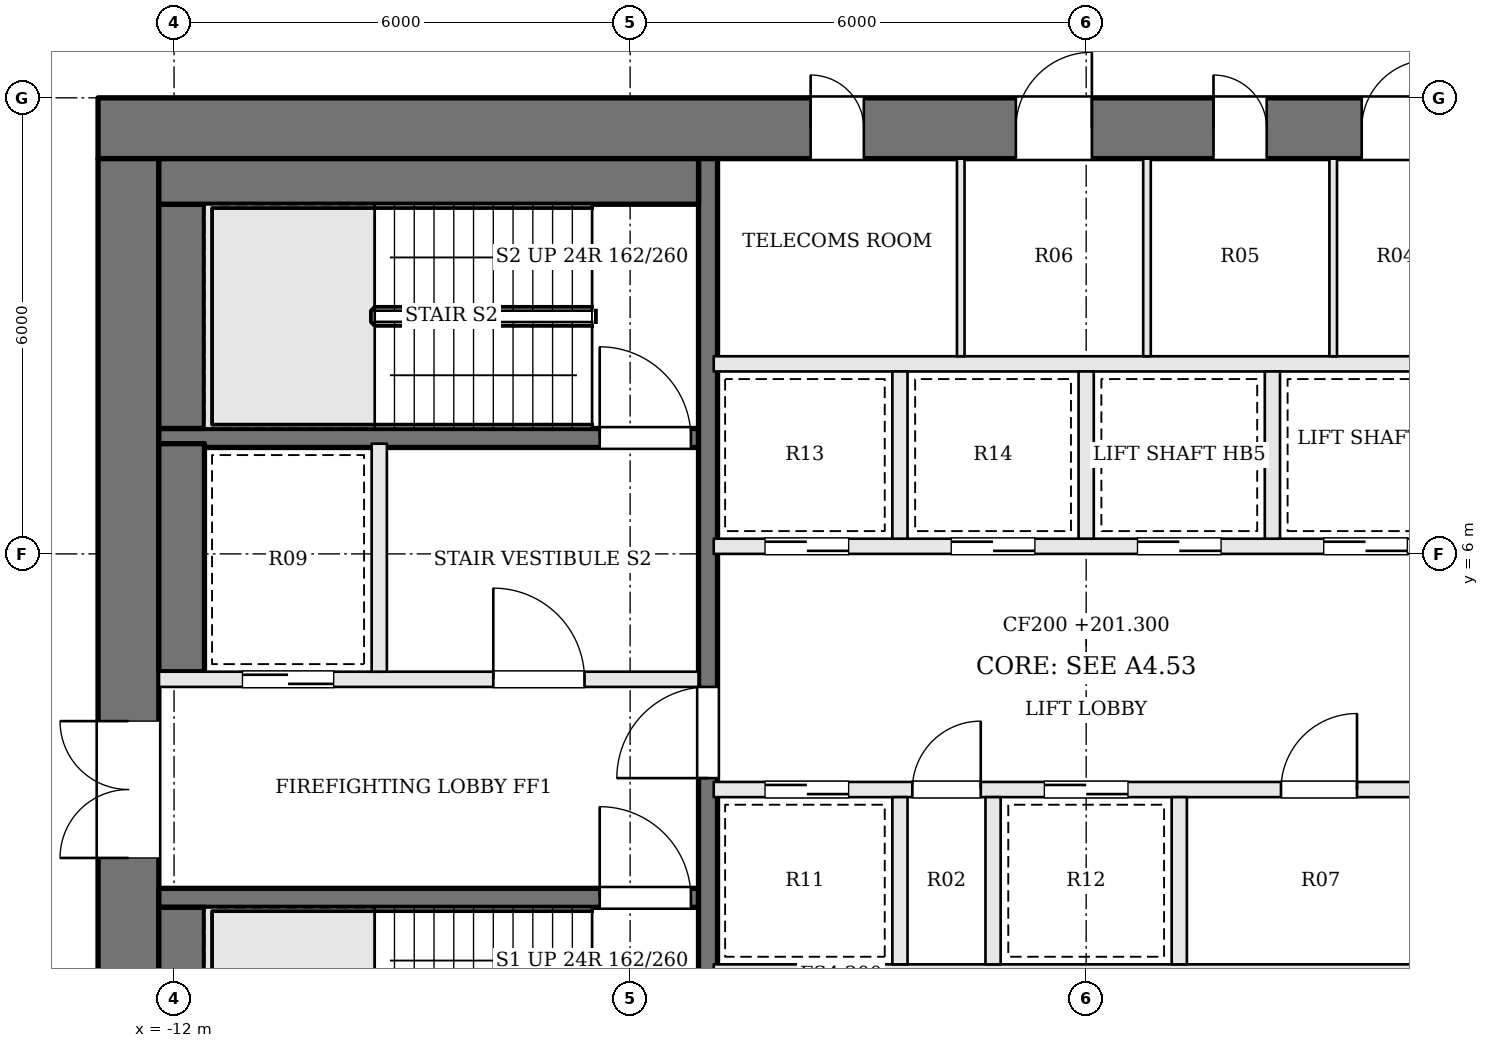
"""IFC4 building model, lengths in metres.
Left out: names, types, materials, properties, quantities, classifications, styles, units other than length and angle.
Written with IfcOpenShell. Run it as: python <this file> out.ifc"""

import sys

from ifc_helpers import new_model, si_unit, direction, frame, frame_2d, origin, place, context, subcontext, project, spatial, rectangle, extrude, element, fill, save


model = new_model("IFC4")
c1 = context("Model", 3, precision=1e-05, world=origin(), true_north=direction((0.0, 1.0)))
c2 = subcontext(c1, "Body", "Model", "MODEL_VIEW")
j1 = project(units=[si_unit("LENGTHUNIT", "METRE"), si_unit("PLANEANGLEUNIT", "RADIAN")], contexts=[c1])
p1 = place(None, origin())
s1 = spatial("IfcSite", under=j1, at=p1, CompositionType="ELEMENT")
p2 = place(p1, origin())
s2 = spatial("IfcBuilding", under=s1, at=p2, CompositionType="ELEMENT")
p3 = place(p2, frame((0.0, 0.0, 201.3)))
s3 = spatial("IfcBuildingStorey", under=s2, at=p3, CompositionType="ELEMENT", Elevation=201.3)
p4 = place(p3, frame((-13.0, 11.6, 0.0), z_axis=(0.0, 0.0, 1.0), x_axis=(1.0, 0.0, 0.0)))
e1 = element("IfcWall", 1, at=p4, inside=s3, PredefinedType="SHEAR", context=c2, shape_type="SweptSolid", body=[
    extrude(rectangle(XDim=26.0, YDim=0.8, at=frame_2d((13.0, 0.0))), origin(), (0.0, 0.0, 1.0), 3.9),
])
p5 = place(p4, frame((9.375, 0.0, 0.0)))
e2 = element("IfcOpeningElement", 2, at=p5, cuts=e1, PredefinedType="OPENING", context=c2, shape_type="SweptSolid", body=[
    extrude(rectangle(XDim=0.7, YDim=2.1, at=frame_2d((0.35, 1.05))), frame((0.0, 0.41, 0.0), z_axis=(0.0, -1.0, 0.0), x_axis=(1.0, 0.0, 0.0)), (0.0, 0.0, 1.0), 0.82),
])
p6 = place(p4, frame((12.075, 0.0, 0.0)))
e3 = element("IfcOpeningElement", 3, at=p6, cuts=e1, PredefinedType="OPENING", context=c2, shape_type="SweptSolid", body=[
    extrude(rectangle(XDim=1.0, YDim=2.1, at=frame_2d((0.5, 1.05))), frame((0.0, 0.41, 0.0), z_axis=(0.0, -1.0, 0.0), x_axis=(1.0, 0.0, 0.0)), (0.0, 0.0, 1.0), 0.82),
])
p7 = place(p4, frame((14.675, 0.0, 0.0)))
e4 = element("IfcOpeningElement", 4, at=p7, cuts=e1, PredefinedType="OPENING", context=c2, shape_type="SweptSolid", body=[
    extrude(rectangle(XDim=0.7, YDim=2.1, at=frame_2d((0.35, 1.05))), frame((0.0, 0.41, 0.0), z_axis=(0.0, -1.0, 0.0), x_axis=(1.0, 0.0, 0.0)), (0.0, 0.0, 1.0), 0.82),
])
p8 = place(p4, frame((16.625, 0.0, 0.0)))
e5 = element("IfcOpeningElement", 5, at=p8, cuts=e1, PredefinedType="OPENING", context=c2, shape_type="SweptSolid", body=[
    extrude(rectangle(XDim=0.9, YDim=2.1, at=frame_2d((0.45, 1.05))), frame((0.0, 0.41, 0.0), z_axis=(0.0, -1.0, 0.0), x_axis=(1.0, 0.0, 0.0)), (0.0, 0.0, 1.0), 0.82),
])
p9 = place(p3, frame((-12.6, -2.2, 0.0), z_axis=(0.0, 0.0, 1.0), x_axis=(0.0, 1.0, 0.0)))
e6 = element("IfcWall", 6, at=p9, inside=s3, PredefinedType="SHEAR", context=c2, shape_type="SweptSolid", body=[
    extrude(rectangle(XDim=13.4, YDim=0.8, at=frame_2d((6.7, 0.0))), origin(), (0.0, 0.0, 1.0), 3.9),
])
p10 = place(p9, frame((4.2, 0.0, 0.0)))
e7 = element("IfcOpeningElement", 7, at=p10, cuts=e6, PredefinedType="OPENING", context=c2, shape_type="SweptSolid", body=[
    extrude(rectangle(XDim=1.8, YDim=2.1, at=frame_2d((0.9, 1.05))), frame((0.0, 0.41, 0.0), z_axis=(0.0, -1.0, 0.0), x_axis=(1.0, 0.0, 0.0)), (0.0, 0.0, 1.0), 0.82),
])
p11 = place(p3, frame((-12.2, 1.475, 0.0), z_axis=(0.0, 0.0, 1.0), x_axis=(1.0, 0.0, 0.0)))
e8 = element("IfcWall", 8, at=p11, inside=s3, PredefinedType="SOLIDWALL", context=c2, shape_type="SweptSolid", body=[
    extrude(rectangle(XDim=7.1, YDim=0.25, at=frame_2d((3.55, 0.0))), origin(), (0.0, 0.0, 1.0), 3.7),
])
p12 = place(p11, frame((5.8, 0.0, 0.0)))
e9 = element("IfcOpeningElement", 9, at=p12, cuts=e8, PredefinedType="OPENING", context=c2, shape_type="SweptSolid", body=[
    extrude(rectangle(XDim=1.2, YDim=2.1, at=frame_2d((0.6, 1.05))), frame((0.0, 0.135, 0.0), z_axis=(0.0, -1.0, 0.0), x_axis=(1.0, 0.0, 0.0)), (0.0, 0.0, 1.0), 0.27),
])
p13 = place(p3, frame((-12.2, 4.35, 0.0), z_axis=(0.0, 0.0, 1.0), x_axis=(1.0, 0.0, 0.0)))
e10 = element("IfcWall", 10, at=p13, inside=s3, PredefinedType="SOLIDWALL", context=c2, shape_type="SweptSolid", body=[
    extrude(rectangle(XDim=7.1, YDim=0.2, at=frame_2d((3.55, 0.0))), origin(), (0.0, 0.0, 1.0), 3.7),
])
p14 = place(p13, frame((4.4, 0.0, 0.0)))
e11 = element("IfcOpeningElement", 11, at=p14, cuts=e10, PredefinedType="OPENING", context=c2, shape_type="SweptSolid", body=[
    extrude(rectangle(XDim=1.2, YDim=2.1, at=frame_2d((0.6, 1.05))), frame((0.0, 0.11, 0.0), z_axis=(0.0, -1.0, 0.0), x_axis=(1.0, 0.0, 0.0)), (0.0, 0.0, 1.0), 0.22),
])
p15 = place(p13, frame((1.1, 0.0, 0.0)))
e12 = element("IfcOpeningElement", 12, at=p15, cuts=e10, PredefinedType="OPENING", context=c2, shape_type="SweptSolid", body=[
    extrude(rectangle(XDim=1.2, YDim=2.1, at=frame_2d((0.6, 1.05))), frame((0.0, 0.11, 0.0), z_axis=(0.0, -1.0, 0.0), x_axis=(1.0, 0.0, 0.0)), (0.0, 0.0, 1.0), 0.22),
])
p16 = place(p3, frame((-12.2, 7.525, 0.0), z_axis=(0.0, 0.0, 1.0), x_axis=(1.0, 0.0, 0.0)))
e13 = element("IfcWall", 13, at=p16, inside=s3, PredefinedType="SOLIDWALL", context=c2, shape_type="SweptSolid", body=[
    extrude(rectangle(XDim=7.1, YDim=0.25, at=frame_2d((3.55, 0.0))), origin(), (0.0, 0.0, 1.0), 3.7),
])
p17 = place(p16, frame((5.8, 0.0, 0.0)))
e14 = element("IfcOpeningElement", 14, at=p17, cuts=e13, PredefinedType="OPENING", context=c2, shape_type="SweptSolid", body=[
    extrude(rectangle(XDim=1.2, YDim=2.1, at=frame_2d((0.6, 1.05))), frame((0.0, 0.135, 0.0), z_axis=(0.0, -1.0, 0.0), x_axis=(1.0, 0.0, 0.0)), (0.0, 0.0, 1.0), 0.27),
])
p18 = place(p3, frame((-9.3, 4.45, 0.0), z_axis=(0.0, 0.0, 1.0), x_axis=(0.0, 1.0, 0.0)))
e15 = element("IfcWall", 15, at=p18, inside=s3, PredefinedType="SOLIDWALL", context=c2, shape_type="SweptSolid", body=[
    extrude(rectangle(XDim=3.0, YDim=0.2, at=frame_2d((1.5, 0.0))), origin(), (0.0, 0.0, 1.0), 3.7),
])
p19 = place(p3, frame((-4.975, -2.2, 0.0), z_axis=(0.0, 0.0, 1.0), x_axis=(0.0, 1.0, 0.0)))
e16 = element("IfcWall", 16, at=p19, inside=s3, PredefinedType="SOLIDWALL", context=c2, shape_type="SweptSolid", body=[
    extrude(rectangle(XDim=13.4, YDim=0.25, at=frame_2d((6.7, 0.0))), origin(), (0.0, 0.0, 1.0), 3.7),
])
p20 = place(p19, frame((5.25, 0.0, 0.0)))
e17 = element("IfcOpeningElement", 17, at=p20, cuts=e16, PredefinedType="OPENING", context=c2, shape_type="SweptSolid", body=[
    extrude(rectangle(XDim=1.2, YDim=2.1, at=frame_2d((0.6, 1.05))), frame((0.0, 0.135, 0.0), z_axis=(0.0, -1.0, 0.0), x_axis=(1.0, 0.0, 0.0)), (0.0, 0.0, 1.0), 0.27),
])
p21 = place(p3, frame((-11.9, -1.6, 0.0), z_axis=(0.0, 0.0, 1.0), x_axis=(0.0, 1.0, 0.0)))
e18 = element("IfcWall", 18, at=p21, inside=s3, PredefinedType="SOLIDWALL", context=c2, shape_type="SweptSolid", body=[
    extrude(rectangle(XDim=2.95, YDim=0.6, at=frame_2d((1.475, 0.0))), origin(), (0.0, 0.0, 1.0), 3.7),
])
p22 = place(p3, frame((-11.9, 4.45, 0.0), z_axis=(0.0, 0.0, 1.0), x_axis=(0.0, 1.0, 0.0)))
e19 = element("IfcWall", 19, at=p22, inside=s3, PredefinedType="SOLIDWALL", context=c2, shape_type="SweptSolid", body=[
    extrude(rectangle(XDim=3.0, YDim=0.6, at=frame_2d((1.5, 0.0))), origin(), (0.0, 0.0, 1.0), 3.7),
])
p23 = place(p3, frame((-11.9, 7.65, 0.0), z_axis=(0.0, 0.0, 1.0), x_axis=(0.0, 1.0, 0.0)))
e20 = element("IfcWall", 20, at=p23, inside=s3, PredefinedType="SOLIDWALL", context=c2, shape_type="SweptSolid", body=[
    extrude(rectangle(XDim=2.95, YDim=0.6, at=frame_2d((1.475, 0.0))), origin(), (0.0, 0.0, 1.0), 3.7),
])
p24 = place(p3, frame((-12.2, 10.9, 0.0), z_axis=(0.0, 0.0, 1.0), x_axis=(1.0, 0.0, 0.0)))
e21 = element("IfcWall", 21, at=p24, inside=s3, PredefinedType="SOLIDWALL", context=c2, shape_type="SweptSolid", body=[
    extrude(rectangle(XDim=7.1, YDim=0.6, at=frame_2d((3.55, 0.0))), origin(), (0.0, 0.0, 1.0), 3.7),
])
p25 = place(p3, frame((-4.9, 0.5, 0.0), z_axis=(0.0, 0.0, 1.0), x_axis=(1.0, 0.0, 0.0)))
e22 = element("IfcWall", 22, at=p25, inside=s3, PredefinedType="SOLIDWALL", context=c2, shape_type="SweptSolid", body=[
    extrude(rectangle(XDim=9.8, YDim=0.2, at=frame_2d((4.9, 0.0))), origin(), (0.0, 0.0, 1.0), 3.7),
])
p26 = place(p3, frame((-4.9, 2.9, 0.0), z_axis=(0.0, 0.0, 1.0), x_axis=(1.0, 0.0, 0.0)))
e23 = element("IfcWall", 23, at=p26, inside=s3, PredefinedType="SOLIDWALL", context=c2, shape_type="SweptSolid", body=[
    extrude(rectangle(XDim=9.8, YDim=0.2, at=frame_2d((4.9, 0.0))), origin(), (0.0, 0.0, 1.0), 3.7),
])
p27 = place(p26, frame((0.675, 0.0, 0.0)))
e24 = element("IfcOpeningElement", 24, at=p27, cuts=e23, PredefinedType="OPENING", context=c2, shape_type="SweptSolid", body=[
    extrude(rectangle(XDim=1.1, YDim=2.1, at=frame_2d((0.55, 1.05))), frame((0.0, 0.11, 0.0), z_axis=(0.0, -1.0, 0.0), x_axis=(1.0, 0.0, 0.0)), (0.0, 0.0, 1.0), 0.22),
])
p28 = place(p26, frame((2.613, 0.0, 0.0)))
e25 = element("IfcOpeningElement", 25, at=p28, cuts=e23, PredefinedType="OPENING", context=c2, shape_type="SweptSolid", body=[
    extrude(rectangle(XDim=0.9, YDim=2.1, at=frame_2d((0.45, 1.05))), frame((0.0, 0.11, 0.0), z_axis=(0.0, -1.0, 0.0), x_axis=(1.0, 0.0, 0.0)), (0.0, 0.0, 1.0), 0.22),
])
p29 = place(p26, frame((4.35, 0.0, 0.0)))
e26 = element("IfcOpeningElement", 26, at=p29, cuts=e23, PredefinedType="OPENING", context=c2, shape_type="SweptSolid", body=[
    extrude(rectangle(XDim=1.1, YDim=2.1, at=frame_2d((0.55, 1.05))), frame((0.0, 0.11, 0.0), z_axis=(0.0, -1.0, 0.0), x_axis=(1.0, 0.0, 0.0)), (0.0, 0.0, 1.0), 0.22),
])
p30 = place(p26, frame((7.463, 0.0, 0.0)))
e27 = element("IfcOpeningElement", 27, at=p30, cuts=e23, PredefinedType="OPENING", context=c2, shape_type="SweptSolid", body=[
    extrude(rectangle(XDim=1.0, YDim=2.1, at=frame_2d((0.5, 1.05))), frame((0.0, 0.11, 0.0), z_axis=(0.0, -1.0, 0.0), x_axis=(1.0, 0.0, 0.0)), (0.0, 0.0, 1.0), 0.22),
])
p31 = place(p3, frame((-4.9, 6.1, 0.0), z_axis=(0.0, 0.0, 1.0), x_axis=(1.0, 0.0, 0.0)))
e28 = element("IfcWall", 28, at=p31, inside=s3, PredefinedType="SOLIDWALL", context=c2, shape_type="SweptSolid", body=[
    extrude(rectangle(XDim=9.8, YDim=0.2, at=frame_2d((4.9, 0.0))), origin(), (0.0, 0.0, 1.0), 3.7),
])
p32 = place(p31, frame((0.675, 0.0, 0.0)))
e29 = element("IfcOpeningElement", 29, at=p32, cuts=e28, PredefinedType="OPENING", context=c2, shape_type="SweptSolid", body=[
    extrude(rectangle(XDim=1.1, YDim=2.1, at=frame_2d((0.55, 1.05))), frame((0.0, 0.11, 0.0), z_axis=(0.0, -1.0, 0.0), x_axis=(1.0, 0.0, 0.0)), (0.0, 0.0, 1.0), 0.22),
])
p33 = place(p31, frame((3.125, 0.0, 0.0)))
e30 = element("IfcOpeningElement", 30, at=p33, cuts=e28, PredefinedType="OPENING", context=c2, shape_type="SweptSolid", body=[
    extrude(rectangle(XDim=1.1, YDim=2.1, at=frame_2d((0.55, 1.05))), frame((0.0, 0.11, 0.0), z_axis=(0.0, -1.0, 0.0), x_axis=(1.0, 0.0, 0.0)), (0.0, 0.0, 1.0), 0.22),
])
p34 = place(p31, frame((5.575, 0.0, 0.0)))
e31 = element("IfcOpeningElement", 31, at=p34, cuts=e28, PredefinedType="OPENING", context=c2, shape_type="SweptSolid", body=[
    extrude(rectangle(XDim=1.1, YDim=2.1, at=frame_2d((0.55, 1.05))), frame((0.0, 0.11, 0.0), z_axis=(0.0, -1.0, 0.0), x_axis=(1.0, 0.0, 0.0)), (0.0, 0.0, 1.0), 0.22),
])
p35 = place(p31, frame((8.025, 0.0, 0.0)))
e32 = element("IfcOpeningElement", 32, at=p35, cuts=e28, PredefinedType="OPENING", context=c2, shape_type="SweptSolid", body=[
    extrude(rectangle(XDim=1.1, YDim=2.1, at=frame_2d((0.55, 1.05))), frame((0.0, 0.11, 0.0), z_axis=(0.0, -1.0, 0.0), x_axis=(1.0, 0.0, 0.0)), (0.0, 0.0, 1.0), 0.22),
])
p36 = place(p3, frame((-4.9, 8.5, 0.0), z_axis=(0.0, 0.0, 1.0), x_axis=(1.0, 0.0, 0.0)))
e33 = element("IfcWall", 33, at=p36, inside=s3, PredefinedType="SOLIDWALL", context=c2, shape_type="SweptSolid", body=[
    extrude(rectangle(XDim=9.8, YDim=0.2, at=frame_2d((4.9, 0.0))), origin(), (0.0, 0.0, 1.0), 3.7),
])
for number, where, z_axis, x_axis in (
    (34, (-2.45, 0.6, 0.0), (0.0, 0.0, 1.0), (0.0, 1.0, 0.0)),
    (35, (-1.225, 0.6, 0.0), (0.0, 0.0, 1.0), (0.0, 1.0, 0.0)),
    (36, (1.225, 0.6, 0.0), (0.0, 0.0, 1.0), (0.0, 1.0, 0.0)),
    (37, (-2.45, 6.2, 0.0), (0.0, 0.0, 1.0), (0.0, 1.0, 0.0)),
    (38, (0.0, 6.2, 0.0), (0.0, 0.0, 1.0), (0.0, 1.0, 0.0)),
    (39, (2.45, 6.2, 0.0), (0.0, 0.0, 1.0), (0.0, 1.0, 0.0)),
):
    element("IfcWall", number, at=place(p3, frame(where, z_axis=z_axis, x_axis=x_axis)), inside=s3, PredefinedType="SOLIDWALL", context=c2, shape_type="SweptSolid", body=[
        extrude(rectangle(XDim=2.2, YDim=0.2, at=frame_2d((1.1, 0.0))), origin(), (0.0, 0.0, 1.0), 3.7),
    ])
for number, where, z_axis, x_axis in (
    (40, (-1.65, 8.6, 0.0), (0.0, 0.0, 1.0), (0.0, 1.0, 0.0)),
    (41, (0.8, 8.6, 0.0), (0.0, 0.0, 1.0), (0.0, 1.0, 0.0)),
    (42, (3.25, 8.6, 0.0), (0.0, 0.0, 1.0), (0.0, 1.0, 0.0)),
):
    element("IfcWall", number, at=place(p3, frame(where, z_axis=z_axis, x_axis=x_axis)), inside=s3, PredefinedType="PARTITIONING", context=c2, shape_type="SweptSolid", body=[
        extrude(rectangle(XDim=2.6, YDim=0.1, at=frame_2d((1.3, 0.0))), origin(), (0.0, 0.0, 1.0), 3.7),
    ])
p37 = place(p10, origin())
e43 = element("IfcDoor", 43, at=p37, inside=s3, OperationType="DOUBLE_DOOR_SINGLE_SWING", PredefinedType="DOOR", context=c2, shape_type="SweptSolid", body=[
    extrude(rectangle(XDim=1.8, YDim=2.1, at=frame_2d((0.9, 1.05))), frame((0.0, 0.025, 0.0), z_axis=(0.0, -1.0, 0.0), x_axis=(1.0, 0.0, 0.0)), (0.0, 0.0, 1.0), 0.05),
])
fill(e7, e43)
p38 = place(p20, origin())
e44 = element("IfcDoor", 44, at=p38, inside=s3, OperationType="SINGLE_SWING_LEFT", PredefinedType="DOOR", context=c2, shape_type="SweptSolid", body=[
    extrude(rectangle(XDim=1.2, YDim=2.1, at=frame_2d((0.6, 1.05))), frame((0.0, 0.025, 0.0), z_axis=(0.0, -1.0, 0.0), x_axis=(1.0, 0.0, 0.0)), (0.0, 0.0, 1.0), 0.05),
])
fill(e17, e44)
p39 = place(p14, origin())
e45 = element("IfcDoor", 45, at=p39, inside=s3, OperationType="SINGLE_SWING_LEFT", PredefinedType="DOOR", context=c2, shape_type="SweptSolid", body=[
    extrude(rectangle(XDim=1.2, YDim=2.1, at=frame_2d((0.6, 1.05))), frame((0.0, 0.025, 0.0), z_axis=(0.0, -1.0, 0.0), x_axis=(1.0, 0.0, 0.0)), (0.0, 0.0, 1.0), 0.05),
])
fill(e11, e45)
p40 = place(p12, origin())
e46 = element("IfcDoor", 46, at=p40, inside=s3, OperationType="SINGLE_SWING_LEFT", PredefinedType="DOOR", context=c2, shape_type="SweptSolid", body=[
    extrude(rectangle(XDim=1.2, YDim=2.1, at=frame_2d((0.6, 1.05))), frame((0.0, 0.025, 0.0), z_axis=(0.0, -1.0, 0.0), x_axis=(1.0, 0.0, 0.0)), (0.0, 0.0, 1.0), 0.05),
])
fill(e9, e46)
p41 = place(p17, origin())
e47 = element("IfcDoor", 47, at=p41, inside=s3, OperationType="SINGLE_SWING_LEFT", PredefinedType="DOOR", context=c2, shape_type="SweptSolid", body=[
    extrude(rectangle(XDim=1.2, YDim=2.1, at=frame_2d((0.6, 1.05))), frame((0.0, 0.025, 0.0), z_axis=(0.0, -1.0, 0.0), x_axis=(1.0, 0.0, 0.0)), (0.0, 0.0, 1.0), 0.05),
])
fill(e14, e47)
p42 = place(p15, origin())
e48 = element("IfcDoor", 48, at=p42, inside=s3, OperationType="SLIDING_TO_RIGHT", PredefinedType="DOOR", context=c2, shape_type="SweptSolid", body=[
    extrude(rectangle(XDim=1.2, YDim=2.1, at=frame_2d((0.6, 1.05))), frame((0.0, 0.025, 0.0), z_axis=(0.0, -1.0, 0.0), x_axis=(1.0, 0.0, 0.0)), (0.0, 0.0, 1.0), 0.05),
])
fill(e12, e48)
p43 = place(p27, origin())
e49 = element("IfcDoor", 49, at=p43, inside=s3, OperationType="SLIDING_TO_RIGHT", PredefinedType="DOOR", context=c2, shape_type="SweptSolid", body=[
    extrude(rectangle(XDim=1.1, YDim=2.1, at=frame_2d((0.55, 1.05))), frame((0.0, 0.025, 0.0), z_axis=(0.0, -1.0, 0.0), x_axis=(1.0, 0.0, 0.0)), (0.0, 0.0, 1.0), 0.05),
])
fill(e24, e49)
p44 = place(p28, origin())
e50 = element("IfcDoor", 50, at=p44, inside=s3, OperationType="SINGLE_SWING_RIGHT", PredefinedType="DOOR", context=c2, shape_type="SweptSolid", body=[
    extrude(rectangle(XDim=0.9, YDim=2.1, at=frame_2d((0.45, 1.05))), frame((0.0, 0.025, 0.0), z_axis=(0.0, -1.0, 0.0), x_axis=(1.0, 0.0, 0.0)), (0.0, 0.0, 1.0), 0.05),
])
fill(e25, e50)
p45 = place(p29, origin())
e51 = element("IfcDoor", 51, at=p45, inside=s3, OperationType="SLIDING_TO_LEFT", PredefinedType="DOOR", context=c2, shape_type="SweptSolid", body=[
    extrude(rectangle(XDim=1.1, YDim=2.1, at=frame_2d((0.55, 1.05))), frame((0.0, 0.025, 0.0), z_axis=(0.0, -1.0, 0.0), x_axis=(1.0, 0.0, 0.0)), (0.0, 0.0, 1.0), 0.05),
])
fill(e26, e51)
p46 = place(p30, origin())
e52 = element("IfcDoor", 52, at=p46, inside=s3, OperationType="SINGLE_SWING_RIGHT", PredefinedType="DOOR", context=c2, shape_type="SweptSolid", body=[
    extrude(rectangle(XDim=1.0, YDim=2.1, at=frame_2d((0.5, 1.05))), frame((0.0, 0.025, 0.0), z_axis=(0.0, -1.0, 0.0), x_axis=(1.0, 0.0, 0.0)), (0.0, 0.0, 1.0), 0.05),
])
fill(e27, e52)
p47 = place(p32, origin())
e53 = element("IfcDoor", 53, at=p47, inside=s3, OperationType="SLIDING_TO_RIGHT", PredefinedType="DOOR", context=c2, shape_type="SweptSolid", body=[
    extrude(rectangle(XDim=1.1, YDim=2.1, at=frame_2d((0.55, 1.05))), frame((0.0, 0.025, 0.0), z_axis=(0.0, -1.0, 0.0), x_axis=(1.0, 0.0, 0.0)), (0.0, 0.0, 1.0), 0.05),
])
fill(e29, e53)
p48 = place(p33, origin())
e54 = element("IfcDoor", 54, at=p48, inside=s3, OperationType="SLIDING_TO_LEFT", PredefinedType="DOOR", context=c2, shape_type="SweptSolid", body=[
    extrude(rectangle(XDim=1.1, YDim=2.1, at=frame_2d((0.55, 1.05))), frame((0.0, 0.025, 0.0), z_axis=(0.0, -1.0, 0.0), x_axis=(1.0, 0.0, 0.0)), (0.0, 0.0, 1.0), 0.05),
])
fill(e30, e54)
p49 = place(p34, origin())
e55 = element("IfcDoor", 55, at=p49, inside=s3, OperationType="SLIDING_TO_RIGHT", PredefinedType="DOOR", context=c2, shape_type="SweptSolid", body=[
    extrude(rectangle(XDim=1.1, YDim=2.1, at=frame_2d((0.55, 1.05))), frame((0.0, 0.025, 0.0), z_axis=(0.0, -1.0, 0.0), x_axis=(1.0, 0.0, 0.0)), (0.0, 0.0, 1.0), 0.05),
])
fill(e31, e55)
p50 = place(p35, origin())
e56 = element("IfcDoor", 56, at=p50, inside=s3, OperationType="SLIDING_TO_LEFT", PredefinedType="DOOR", context=c2, shape_type="SweptSolid", body=[
    extrude(rectangle(XDim=1.1, YDim=2.1, at=frame_2d((0.55, 1.05))), frame((0.0, 0.025, 0.0), z_axis=(0.0, -1.0, 0.0), x_axis=(1.0, 0.0, 0.0)), (0.0, 0.0, 1.0), 0.05),
])
fill(e32, e56)
p51 = place(p5, origin())
e57 = element("IfcDoor", 57, at=p51, inside=s3, OperationType="SINGLE_SWING_LEFT", PredefinedType="DOOR", context=c2, shape_type="SweptSolid", body=[
    extrude(rectangle(XDim=0.7, YDim=2.1, at=frame_2d((0.35, 1.05))), frame((0.0, 0.025, 0.0), z_axis=(0.0, -1.0, 0.0), x_axis=(1.0, 0.0, 0.0)), (0.0, 0.0, 1.0), 0.05),
])
fill(e2, e57)
p52 = place(p6, origin())
e58 = element("IfcDoor", 58, at=p52, inside=s3, OperationType="SINGLE_SWING_RIGHT", PredefinedType="DOOR", context=c2, shape_type="SweptSolid", body=[
    extrude(rectangle(XDim=1.0, YDim=2.1, at=frame_2d((0.5, 1.05))), frame((0.0, 0.025, 0.0), z_axis=(0.0, -1.0, 0.0), x_axis=(1.0, 0.0, 0.0)), (0.0, 0.0, 1.0), 0.05),
])
fill(e3, e58)
p53 = place(p7, origin())
e59 = element("IfcDoor", 59, at=p53, inside=s3, OperationType="SINGLE_SWING_LEFT", PredefinedType="DOOR", context=c2, shape_type="SweptSolid", body=[
    extrude(rectangle(XDim=0.7, YDim=2.1, at=frame_2d((0.35, 1.05))), frame((0.0, 0.025, 0.0), z_axis=(0.0, -1.0, 0.0), x_axis=(1.0, 0.0, 0.0)), (0.0, 0.0, 1.0), 0.05),
])
fill(e4, e59)
p54 = place(p8, origin())
e60 = element("IfcDoor", 60, at=p54, inside=s3, OperationType="SINGLE_SWING_RIGHT", PredefinedType="DOOR", context=c2, shape_type="SweptSolid", body=[
    extrude(rectangle(XDim=0.9, YDim=2.1, at=frame_2d((0.45, 1.05))), frame((0.0, 0.025, 0.0), z_axis=(0.0, -1.0, 0.0), x_axis=(1.0, 0.0, 0.0)), (0.0, 0.0, 1.0), 0.05),
])
fill(e5, e60)
save(model, sys.argv[1])
